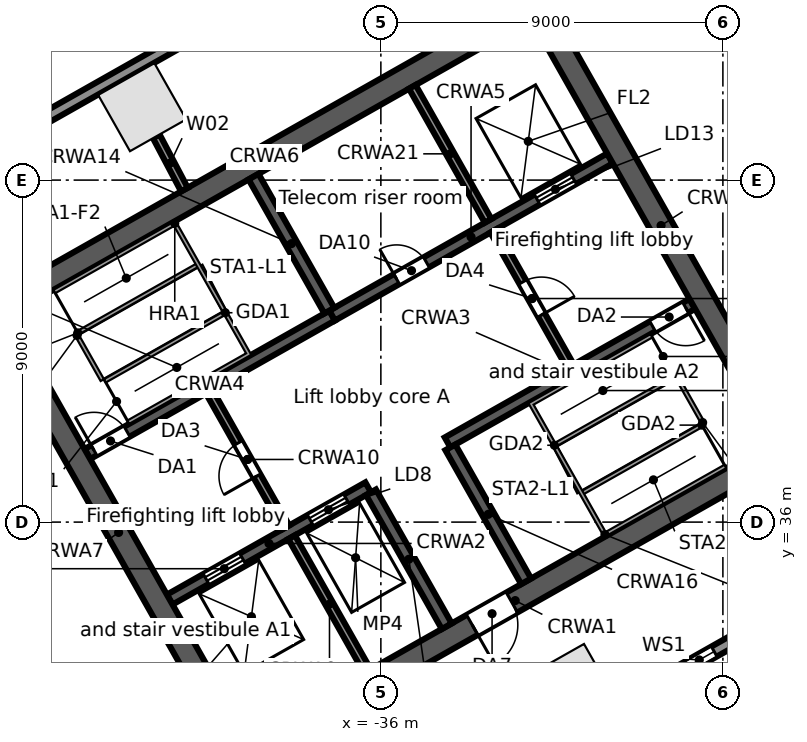
"""IFC4 building model, lengths in metres.
Left out: names, types, materials, properties, quantities, classifications, styles, units other than length and angle.
Written with IfcOpenShell. Run it as: python <this file> out.ifc"""

import sys

from ifc_helpers import new_model, si_unit, direction, frame, frame_2d, origin, origin_2d, place, context, subcontext, project, spatial, rectangle, extrude, element, fill, save


model = new_model("IFC4")
c1 = context("Model", 3, precision=1e-05, world=origin(), true_north=direction((0.0, 1.0)))
c2 = subcontext(c1, "Body", "Model", "MODEL_VIEW")
j1 = project(units=[si_unit("LENGTHUNIT", "METRE"), si_unit("PLANEANGLEUNIT", "RADIAN")], contexts=[c1])
p1 = place(None, origin())
s1 = spatial("IfcSite", under=j1, at=p1, CompositionType="ELEMENT")
p2 = place(p1, origin())
s2 = spatial("IfcBuilding", under=s1, at=p2, CompositionType="ELEMENT")
p3 = place(p2, frame((0.0, 0.0, 71.5)))
s3 = spatial("IfcBuildingStorey", under=s2, at=p3, CompositionType="ELEMENT", Elevation=71.5)
for number, where, z_axis, x_axis in (
    (1, (-42.28, 46.919, 0.0), (0.0, 0.0, 1.0), (-0.87, -0.492, 0.0)),
    (2, (-30.976, 31.635, 0.0), (0.0, 0.0, 1.0), (0.87, 0.492, 0.0)),
):
    element("IfcColumn", number, at=place(p3, frame(where, z_axis=z_axis, x_axis=x_axis)), inside=s3, PredefinedType="COLUMN", context=c2, shape_type="SweptSolid", body=[
        extrude(rectangle(XDim=1.7, YDim=1.7, at=origin_2d()), origin(), (0.0, 0.0, 1.0), 5.0),
    ])
p4 = place(p3, frame((-58.745, 38.764, 0.0), z_axis=(0.0, 0.0, 1.0), x_axis=(0.870355811726, 0.492423355453, 0.0)))
e3 = element("IfcWall", 3, at=p4, inside=s3, PredefinedType="STANDARD", context=c2, shape_type="SweptSolid", body=[
    extrude(rectangle(XDim=64.025, YDim=0.3, at=frame_2d((32.013, 0.0))), origin(), (0.0, 0.0, 1.0), 4.68),
])
p5 = place(p4, frame((60.122, 0.0, 0.6)))
e4 = element("IfcOpeningElement", 4, at=p5, cuts=e3, PredefinedType="OPENING", context=c2, shape_type="SweptSolid", body=[
    extrude(rectangle(XDim=0.9, YDim=3.2, at=frame_2d((0.45, 1.6))), frame((0.0, 0.16, 0.0), z_axis=(0.0, -1.0, 0.0), x_axis=(1.0, 0.0, 0.0)), (0.0, 0.0, 1.0), 0.32),
])
p6 = place(p4, frame((50.992, 0.0, 0.6)))
e5 = element("IfcOpeningElement", 5, at=p6, cuts=e3, PredefinedType="OPENING", context=c2, shape_type="SweptSolid", body=[
    extrude(rectangle(XDim=0.9, YDim=3.2, at=frame_2d((0.45, 1.6))), frame((0.0, 0.16, 0.0), z_axis=(0.0, -1.0, 0.0), x_axis=(1.0, 0.0, 0.0)), (0.0, 0.0, 1.0), 0.32),
])
p7 = place(p4, frame((41.862, 0.0, 0.6)))
e6 = element("IfcOpeningElement", 6, at=p7, cuts=e3, PredefinedType="OPENING", context=c2, shape_type="SweptSolid", body=[
    extrude(rectangle(XDim=0.9, YDim=3.2, at=frame_2d((0.45, 1.6))), frame((0.0, 0.16, 0.0), z_axis=(0.0, -1.0, 0.0), x_axis=(1.0, 0.0, 0.0)), (0.0, 0.0, 1.0), 0.32),
])
p8 = place(p4, frame((32.732, 0.0, 0.6)))
e7 = element("IfcOpeningElement", 7, at=p8, cuts=e3, PredefinedType="OPENING", context=c2, shape_type="SweptSolid", body=[
    extrude(rectangle(XDim=0.9, YDim=3.2, at=frame_2d((0.45, 1.6))), frame((0.0, 0.16, 0.0), z_axis=(0.0, -1.0, 0.0), x_axis=(1.0, 0.0, 0.0)), (0.0, 0.0, 1.0), 0.32),
])
p9 = place(p4, frame((23.602, 0.0, 0.6)))
e8 = element("IfcOpeningElement", 8, at=p9, cuts=e3, PredefinedType="OPENING", context=c2, shape_type="SweptSolid", body=[
    extrude(rectangle(XDim=0.9, YDim=3.2, at=frame_2d((0.45, 1.6))), frame((0.0, 0.16, 0.0), z_axis=(0.0, -1.0, 0.0), x_axis=(1.0, 0.0, 0.0)), (0.0, 0.0, 1.0), 0.32),
])
p10 = place(p4, frame((14.472, 0.0, 0.6)))
e9 = element("IfcOpeningElement", 9, at=p10, cuts=e3, PredefinedType="OPENING", context=c2, shape_type="SweptSolid", body=[
    extrude(rectangle(XDim=0.9, YDim=3.2, at=frame_2d((0.45, 1.6))), frame((0.0, 0.16, 0.0), z_axis=(0.0, -1.0, 0.0), x_axis=(1.0, 0.0, 0.0)), (0.0, 0.0, 1.0), 0.32),
])
p11 = place(p4, frame((5.342, 0.0, 0.6)))
e10 = element("IfcOpeningElement", 10, at=p11, cuts=e3, PredefinedType="OPENING", context=c2, shape_type="SweptSolid", body=[
    extrude(rectangle(XDim=0.9, YDim=3.2, at=frame_2d((0.45, 1.6))), frame((0.0, 0.16, 0.0), z_axis=(0.0, -1.0, 0.0), x_axis=(1.0, 0.0, 0.0)), (0.0, 0.0, 1.0), 0.32),
])
p12 = place(p3, frame((-44.109, 26.504, 0.0), z_axis=(0.0, 0.0, 1.0), x_axis=(-0.857169502585, 0.515034410344, 0.0)))
e11 = element("IfcWall", 11, at=p12, inside=s3, PredefinedType="STANDARD", context=c2, shape_type="SweptSolid", body=[
    extrude(rectangle(XDim=17.127, YDim=0.3, at=frame_2d((8.563, 0.0))), origin(), (0.0, 0.0, 1.0), 4.68),
])
p13 = place(p12, frame((13.403, 0.0, 0.6)))
e12 = element("IfcOpeningElement", 12, at=p13, cuts=e11, PredefinedType="OPENING", context=c2, shape_type="SweptSolid", body=[
    extrude(rectangle(XDim=0.9, YDim=3.2, at=frame_2d((0.45, 1.6))), frame((0.0, 0.16, 0.0), z_axis=(0.0, -1.0, 0.0), x_axis=(1.0, 0.0, 0.0)), (0.0, 0.0, 1.0), 0.32),
])
p14 = place(p12, frame((4.903, 0.0, 0.6)))
e13 = element("IfcOpeningElement", 13, at=p14, cuts=e11, PredefinedType="OPENING", context=c2, shape_type="SweptSolid", body=[
    extrude(rectangle(XDim=0.9, YDim=3.2, at=frame_2d((0.45, 1.6))), frame((0.0, 0.16, 0.0), z_axis=(0.0, -1.0, 0.0), x_axis=(1.0, 0.0, 0.0)), (0.0, 0.0, 1.0), 0.32),
])
p15 = place(p3, frame((-0.055, 47.969, 0.0), z_axis=(0.0, 0.0, 1.0), x_axis=(-0.870355730478, -0.492423499058, 0.0)))
e14 = element("IfcWall", 14, at=p15, inside=s3, PredefinedType="STANDARD", context=c2, shape_type="SweptSolid", body=[
    extrude(rectangle(XDim=43.75, YDim=0.3, at=frame_2d((21.875, 0.0))), origin(), (0.0, 0.0, 1.0), 4.68),
])
p16 = place(p15, frame((39.977, 0.0, 0.6)))
e15 = element("IfcOpeningElement", 15, at=p16, cuts=e14, PredefinedType="OPENING", context=c2, shape_type="SweptSolid", body=[
    extrude(rectangle(XDim=0.9, YDim=3.2, at=frame_2d((0.45, 1.6))), frame((0.0, 0.16, 0.0), z_axis=(0.0, -1.0, 0.0), x_axis=(1.0, 0.0, 0.0)), (0.0, 0.0, 1.0), 0.32),
])
p17 = place(p15, frame((31.222, 0.0, 0.6)))
e16 = element("IfcOpeningElement", 16, at=p17, cuts=e14, PredefinedType="OPENING", context=c2, shape_type="SweptSolid", body=[
    extrude(rectangle(XDim=0.9, YDim=3.2, at=frame_2d((0.45, 1.6))), frame((0.0, 0.16, 0.0), z_axis=(0.0, -1.0, 0.0), x_axis=(1.0, 0.0, 0.0)), (0.0, 0.0, 1.0), 0.32),
])
p18 = place(p15, frame((22.468, 0.0, 0.6)))
e17 = element("IfcOpeningElement", 17, at=p18, cuts=e14, PredefinedType="OPENING", context=c2, shape_type="SweptSolid", body=[
    extrude(rectangle(XDim=0.9, YDim=3.2, at=frame_2d((0.45, 1.6))), frame((0.0, 0.16, 0.0), z_axis=(0.0, -1.0, 0.0), x_axis=(1.0, 0.0, 0.0)), (0.0, 0.0, 1.0), 0.32),
])
p19 = place(p15, frame((13.713, 0.0, 0.6)))
e18 = element("IfcOpeningElement", 18, at=p19, cuts=e14, PredefinedType="OPENING", context=c2, shape_type="SweptSolid", body=[
    extrude(rectangle(XDim=0.9, YDim=3.2, at=frame_2d((0.45, 1.6))), frame((0.0, 0.16, 0.0), z_axis=(0.0, -1.0, 0.0), x_axis=(1.0, 0.0, 0.0)), (0.0, 0.0, 1.0), 0.32),
])
p20 = place(p15, frame((4.959, 0.0, 0.6)))
e19 = element("IfcOpeningElement", 19, at=p20, cuts=e14, PredefinedType="OPENING", context=c2, shape_type="SweptSolid", body=[
    extrude(rectangle(XDim=0.9, YDim=3.2, at=frame_2d((0.45, 1.6))), frame((0.0, 0.16, 0.0), z_axis=(0.0, -1.0, 0.0), x_axis=(1.0, 0.0, 0.0)), (0.0, 0.0, 1.0), 0.32),
])
p21 = place(p3, frame((-39.862, 29.749, 0.0), z_axis=(0.0, 0.0, 1.0), x_axis=(0.870350116061, 0.492433422375, 0.0)))
e20 = element("IfcWall", 20, at=p21, inside=s3, PredefinedType="SOLIDWALL", context=c2, shape_type="SweptSolid", body=[
    extrude(rectangle(XDim=17.0, YDim=0.6, at=frame_2d((8.5, 0.0))), origin(), (0.0, 0.0, 1.0), 4.68),
])
p22 = place(p21, frame((7.2, 0.0, 0.0)))
e21 = element("IfcOpeningElement", 21, at=p22, cuts=e20, PredefinedType="OPENING", context=c2, shape_type="SweptSolid", body=[
    extrude(rectangle(XDim=1.2, YDim=2.1, at=frame_2d((0.6, 1.05))), frame((0.0, 0.31, 0.0), z_axis=(0.0, -1.0, 0.0), x_axis=(1.0, 0.0, 0.0)), (0.0, 0.0, 1.0), 0.62),
])
p23 = place(p3, frame((-41.556, 33.961, 0.0), z_axis=(0.0, 0.0, 1.0), x_axis=(0.870343731308, 0.492444706919, 0.0)))
e22 = element("IfcWall", 22, at=p23, inside=s3, PredefinedType="SOLIDWALL", context=c2, shape_type="SweptSolid", body=[
    extrude(rectangle(XDim=6.0, YDim=0.3, at=frame_2d((3.0, 0.0))), origin(), (0.0, 0.0, 1.0), 4.68),
])
p24 = place(p23, frame((1.1, 0.0, 0.0)))
e23 = element("IfcOpeningElement", 23, at=p24, cuts=e22, PredefinedType="OPENING", context=c2, shape_type="SweptSolid", body=[
    extrude(rectangle(XDim=1.1, YDim=2.1, at=frame_2d((0.55, 1.05))), frame((0.0, 0.16, 0.0), z_axis=(0.0, -1.0, 0.0), x_axis=(1.0, 0.0, 0.0)), (0.0, 0.0, 1.0), 0.32),
])
p25 = place(p23, frame((4.25, 0.0, 0.0)))
e24 = element("IfcOpeningElement", 24, at=p25, cuts=e22, PredefinedType="OPENING", context=c2, shape_type="SweptSolid", body=[
    extrude(rectangle(XDim=1.1, YDim=2.1, at=frame_2d((0.55, 1.05))), frame((0.0, 0.16, 0.0), z_axis=(0.0, -1.0, 0.0), x_axis=(1.0, 0.0, 0.0)), (0.0, 0.0, 1.0), 0.32),
])
p26 = place(p3, frame((-34.245, 38.097, 0.0), z_axis=(0.0, 0.0, 1.0), x_axis=(0.870364910201, 0.492407273597, 0.0)))
e25 = element("IfcWall", 25, at=p26, inside=s3, PredefinedType="SOLIDWALL", context=c2, shape_type="SweptSolid", body=[
    extrude(rectangle(XDim=7.4, YDim=0.3, at=frame_2d((3.7, 0.0))), origin(), (0.0, 0.0, 1.0), 4.68),
])
p27 = place(p26, frame((6.2, 0.0, 0.0)))
e26 = element("IfcOpeningElement", 26, at=p27, cuts=e25, PredefinedType="OPENING", context=c2, shape_type="SweptSolid", body=[
    extrude(rectangle(XDim=1.0, YDim=2.1, at=frame_2d((0.5, 1.05))), frame((0.0, 0.16, 0.0), z_axis=(0.0, -1.0, 0.0), x_axis=(1.0, 0.0, 0.0)), (0.0, 0.0, 1.0), 0.32),
])
p28 = place(p3, frame((-43.723, 37.791, 0.0), z_axis=(0.0, 0.0, 1.0), x_axis=(0.87035077051, 0.49243226567, 0.0)))
e27 = element("IfcWall", 27, at=p28, inside=s3, PredefinedType="SOLIDWALL", context=c2, shape_type="SweptSolid", body=[
    extrude(rectangle(XDim=7.4, YDim=0.3, at=frame_2d((3.7, 0.0))), origin(), (0.0, 0.0, 1.0), 4.68),
])
p29 = place(p28, frame((0.2, 0.0, 0.0)))
e28 = element("IfcOpeningElement", 28, at=p29, cuts=e27, PredefinedType="OPENING", context=c2, shape_type="SweptSolid", body=[
    extrude(rectangle(XDim=1.0, YDim=2.1, at=frame_2d((0.5, 1.05))), frame((0.0, 0.16, 0.0), z_axis=(0.0, -1.0, 0.0), x_axis=(1.0, 0.0, 0.0)), (0.0, 0.0, 1.0), 0.32),
])
p30 = place(p3, frame((-37.282, 41.435, 0.0), z_axis=(0.0, 0.0, 1.0), x_axis=(0.870356516133, 0.492422110414, 0.0)))
e29 = element("IfcWall", 29, at=p30, inside=s3, PredefinedType="SOLIDWALL", context=c2, shape_type="SweptSolid", body=[
    extrude(rectangle(XDim=8.4, YDim=0.3, at=frame_2d((4.2, 0.0))), origin(), (0.0, 0.0, 1.0), 4.68),
])
p31 = place(p30, frame((6.2, 0.0, 0.0)))
e30 = element("IfcOpeningElement", 30, at=p31, cuts=e29, PredefinedType="OPENING", context=c2, shape_type="SweptSolid", body=[
    extrude(rectangle(XDim=1.1, YDim=2.1, at=frame_2d((0.55, 1.05))), frame((0.0, 0.16, 0.0), z_axis=(0.0, -1.0, 0.0), x_axis=(1.0, 0.0, 0.0)), (0.0, 0.0, 1.0), 0.32),
])
p32 = place(p30, frame((1.95, 0.0, 0.0)))
e31 = element("IfcOpeningElement", 31, at=p32, cuts=e29, PredefinedType="OPENING", context=c2, shape_type="SweptSolid", body=[
    extrude(rectangle(XDim=0.9, YDim=2.1, at=frame_2d((0.45, 1.05))), frame((0.0, 0.16, 0.0), z_axis=(0.0, -1.0, 0.0), x_axis=(1.0, 0.0, 0.0)), (0.0, 0.0, 1.0), 0.32),
])
p33 = place(p3, frame((-46.461, 41.412, 0.0), z_axis=(0.0, 0.0, 1.0), x_axis=(0.870350116061, 0.492433422375, 0.0)))
e32 = element("IfcWall", 32, at=p33, inside=s3, PredefinedType="SOLIDWALL", context=c2, shape_type="SweptSolid", body=[
    extrude(rectangle(XDim=17.0, YDim=0.6, at=frame_2d((8.5, 0.0))), origin(), (0.0, 0.0, 1.0), 4.68),
])
p34 = place(p3, frame((-46.052, 41.298, 0.0), z_axis=(0.0, 0.0, 1.0), x_axis=(0.492418598281, -0.870358503186, 0.0)))
e33 = element("IfcWall", 33, at=p34, inside=s3, PredefinedType="SOLIDWALL", context=c2, shape_type="SweptSolid", body=[
    extrude(rectangle(XDim=12.8, YDim=0.6, at=frame_2d((6.4, 0.0))), origin(), (0.0, 0.0, 1.0), 4.68),
])
p35 = place(p3, frame((-38.349, 35.603, 0.0), z_axis=(0.0, 0.0, 1.0), x_axis=(0.49241474071, -0.870360685654, 0.0)))
e34 = element("IfcWall", 34, at=p35, inside=s3, PredefinedType="SOLIDWALL", context=c2, shape_type="SweptSolid", body=[
    extrude(rectangle(XDim=4.05, YDim=0.2, at=frame_2d((2.025, 0.0))), origin(), (0.0, 0.0, 1.0), 4.68),
])
p36 = place(p3, frame((-40.516, 39.433, 0.0), z_axis=(0.0, 0.0, 1.0), x_axis=(0.492453559952, -0.87033872216, 0.0)))
e35 = element("IfcWall", 35, at=p36, inside=s3, PredefinedType="PARTITIONING", context=c2, shape_type="SweptSolid", body=[
    extrude(rectangle(XDim=4.1, YDim=0.2, at=frame_2d((2.05, 0.0))), origin(), (0.0, 0.0, 1.0), 4.68),
])
p37 = place(p36, frame((1.55, 0.0, 0.0)))
e36 = element("IfcOpeningElement", 36, at=p37, cuts=e35, PredefinedType="OPENING", context=c2, shape_type="SweptSolid", body=[
    extrude(rectangle(XDim=1.0, YDim=2.1, at=frame_2d((0.5, 1.05))), frame((0.0, 0.11, 0.0), z_axis=(0.0, -1.0, 0.0), x_axis=(1.0, 0.0, 0.0)), (0.0, 0.0, 1.0), 0.22),
])
p38 = place(p3, frame((-36.26, 36.785, 0.0), z_axis=(0.0, 0.0, 1.0), x_axis=(0.492440575896, -0.870346068648, 0.0)))
e37 = element("IfcWall", 37, at=p38, inside=s3, PredefinedType="SOLIDWALL", context=c2, shape_type="SweptSolid", body=[
    extrude(rectangle(XDim=4.05, YDim=0.3, at=frame_2d((2.025, 0.0))), origin(), (0.0, 0.0, 1.0), 4.68),
])
p39 = place(p3, frame((-39.35, 45.09, 0.0), z_axis=(0.0, 0.0, 1.0), x_axis=(0.49241474071, -0.870360685654, 0.0)))
e38 = element("IfcWall", 38, at=p39, inside=s3, PredefinedType="SOLIDWALL", context=c2, shape_type="SweptSolid", body=[
    extrude(rectangle(XDim=4.05, YDim=0.3, at=frame_2d((2.025, 0.0))), origin(), (0.0, 0.0, 1.0), 4.68),
])
p40 = place(p3, frame((-34.171, 37.967, 0.0), z_axis=(0.0, 0.0, 1.0), x_axis=(0.492394910396, -0.870371904542, 0.0)))
e39 = element("IfcWall", 39, at=p40, inside=s3, PredefinedType="SOLIDWALL", context=c2, shape_type="SweptSolid", body=[
    extrude(rectangle(XDim=4.05, YDim=0.3, at=frame_2d((2.025, 0.0))), origin(), (0.0, 0.0, 1.0), 4.68),
])
p41 = place(p3, frame((-33.031, 43.667, 0.0), z_axis=(0.0, 0.0, 1.0), x_axis=(0.492408451753, -0.87036424366, 0.0)))
e40 = element("IfcWall", 40, at=p41, inside=s3, PredefinedType="PARTITIONING", context=c2, shape_type="SweptSolid", body=[
    extrude(rectangle(XDim=4.1, YDim=0.2, at=frame_2d((2.05, 0.0))), origin(), (0.0, 0.0, 1.0), 4.68),
])
p42 = place(p41, frame((1.55, 0.0, 0.0)))
e41 = element("IfcOpeningElement", 41, at=p42, cuts=e40, PredefinedType="OPENING", context=c2, shape_type="SweptSolid", body=[
    extrude(rectangle(XDim=1.0, YDim=2.1, at=frame_2d((0.5, 1.05))), frame((0.0, 0.11, 0.0), z_axis=(0.0, -1.0, 0.0), x_axis=(1.0, 0.0, 0.0)), (0.0, 0.0, 1.0), 0.22),
])
p43 = place(p3, frame((-35.173, 47.454, 0.0), z_axis=(0.0, 0.0, 1.0), x_axis=(0.492440575896, -0.870346068648, 0.0)))
e42 = element("IfcWall", 42, at=p43, inside=s3, PredefinedType="SOLIDWALL", context=c2, shape_type="SweptSolid", body=[
    extrude(rectangle(XDim=4.05, YDim=0.2, at=frame_2d((2.025, 0.0))), origin(), (0.0, 0.0, 1.0), 4.68),
])
p44 = place(p3, frame((-31.778, 49.374, 0.0), z_axis=(0.0, 0.0, 1.0), x_axis=(0.492433046652, -0.870350328641, 0.0)))
e43 = element("IfcWall", 43, at=p44, inside=s3, PredefinedType="SOLIDWALL", context=c2, shape_type="SweptSolid", body=[
    extrude(rectangle(XDim=12.8, YDim=0.6, at=frame_2d((6.4, 0.0))), origin(), (0.0, 0.0, 1.0), 4.68),
])
p45 = place(p3, frame((-41.909, 46.152, 0.0), z_axis=(0.0, 0.0, 1.0), x_axis=(0.466755273883, -0.884386518612, 0.0)))
e44 = element("IfcWall", 44, at=p45, inside=s3, PredefinedType="PARTITIONING", context=c2, shape_type="SweptSolid", body=[
    extrude(rectangle(XDim=1.585, YDim=0.2, at=frame_2d((0.793, 0.0))), origin(), (0.0, 0.0, 1.0), 4.26),
])
p46 = place(p17, origin())
e45 = element("IfcWindow", 45, at=p46, inside=s3, PartitioningType="SINGLE_PANEL", PredefinedType="WINDOW", context=c2, shape_type="SweptSolid", body=[
    extrude(rectangle(XDim=0.9, YDim=3.2, at=frame_2d((0.45, 1.6))), frame((0.0, 0.03, 0.0), z_axis=(0.0, -1.0, 0.0), x_axis=(1.0, 0.0, 0.0)), (0.0, 0.0, 1.0), 0.06),
])
fill(e16, e45)
p47 = place(p31, origin())
e46 = element("IfcDoor", 46, at=p47, inside=s3, OperationType="DOUBLE_DOOR_SLIDING", PredefinedType="DOOR", context=c2, shape_type="SweptSolid", body=[
    extrude(rectangle(XDim=1.1, YDim=2.1, at=frame_2d((0.55, 1.05))), frame((0.0, 0.025, 0.0), z_axis=(0.0, -1.0, 0.0), x_axis=(1.0, 0.0, 0.0)), (0.0, 0.0, 1.0), 0.05),
])
fill(e30, e46)
p48 = place(p24, origin())
e47 = element("IfcDoor", 47, at=p48, inside=s3, OperationType="DOUBLE_DOOR_SLIDING", PredefinedType="DOOR", context=c2, shape_type="SweptSolid", body=[
    extrude(rectangle(XDim=1.1, YDim=2.1, at=frame_2d((0.55, 1.05))), frame((0.0, 0.025, 0.0), z_axis=(0.0, -1.0, 0.0), x_axis=(1.0, 0.0, 0.0)), (0.0, 0.0, 1.0), 0.05),
])
fill(e23, e47)
p49 = place(p25, origin())
e48 = element("IfcDoor", 48, at=p49, inside=s3, OperationType="DOUBLE_DOOR_SLIDING", PredefinedType="DOOR", context=c2, shape_type="SweptSolid", body=[
    extrude(rectangle(XDim=1.1, YDim=2.1, at=frame_2d((0.55, 1.05))), frame((0.0, 0.025, 0.0), z_axis=(0.0, -1.0, 0.0), x_axis=(1.0, 0.0, 0.0)), (0.0, 0.0, 1.0), 0.05),
])
fill(e24, e48)
p50 = place(p29, origin())
e49 = element("IfcDoor", 49, at=p50, inside=s3, OperationType="SINGLE_SWING_LEFT", PredefinedType="DOOR", context=c2, shape_type="SweptSolid", body=[
    extrude(rectangle(XDim=1.0, YDim=2.1, at=frame_2d((0.5, 1.05))), frame((0.0, 0.025, 0.0), z_axis=(0.0, -1.0, 0.0), x_axis=(1.0, 0.0, 0.0)), (0.0, 0.0, 1.0), 0.05),
])
fill(e28, e49)
p51 = place(p27, frame((1.0, 0.0, 0.0), z_axis=(0.0, 0.0, 1.0), x_axis=(-1.0, 0.0, 0.0)))
e50 = element("IfcDoor", 50, at=p51, inside=s3, OperationType="SINGLE_SWING_LEFT", PredefinedType="DOOR", context=c2, shape_type="SweptSolid", body=[
    extrude(rectangle(XDim=1.0, YDim=2.1, at=frame_2d((0.5, 1.05))), frame((0.0, 0.025, 0.0), z_axis=(0.0, -1.0, 0.0), x_axis=(1.0, 0.0, 0.0)), (0.0, 0.0, 1.0), 0.05),
])
fill(e26, e50)
p52 = place(p37, frame((1.0, 0.0, 0.0), z_axis=(0.0, 0.0, 1.0), x_axis=(-1.0, 0.0, 0.0)))
e51 = element("IfcDoor", 51, at=p52, inside=s3, OperationType="SINGLE_SWING_LEFT", PredefinedType="DOOR", context=c2, shape_type="SweptSolid", body=[
    extrude(rectangle(XDim=1.0, YDim=2.1, at=frame_2d((0.5, 1.05))), frame((0.0, 0.025, 0.0), z_axis=(0.0, -1.0, 0.0), x_axis=(1.0, 0.0, 0.0)), (0.0, 0.0, 1.0), 0.05),
])
fill(e36, e51)
p53 = place(p42, origin())
e52 = element("IfcDoor", 52, at=p53, inside=s3, OperationType="SINGLE_SWING_RIGHT", PredefinedType="DOOR", context=c2, shape_type="SweptSolid", body=[
    extrude(rectangle(XDim=1.0, YDim=2.1, at=frame_2d((0.5, 1.05))), frame((0.0, 0.025, 0.0), z_axis=(0.0, -1.0, 0.0), x_axis=(1.0, 0.0, 0.0)), (0.0, 0.0, 1.0), 0.05),
])
fill(e41, e52)
p54 = place(p22, frame((1.2, 0.0, 0.0), z_axis=(0.0, 0.0, 1.0), x_axis=(-1.0, 0.0, 0.0)))
e53 = element("IfcDoor", 53, at=p54, inside=s3, OperationType="SINGLE_SWING_RIGHT", PredefinedType="DOOR", context=c2, shape_type="SweptSolid", body=[
    extrude(rectangle(XDim=1.2, YDim=2.1, at=frame_2d((0.6, 1.05))), frame((0.0, 0.025, 0.0), z_axis=(0.0, -1.0, 0.0), x_axis=(1.0, 0.0, 0.0)), (0.0, 0.0, 1.0), 0.05),
])
fill(e21, e53)
p55 = place(p32, origin())
e54 = element("IfcDoor", 54, at=p55, inside=s3, OperationType="SINGLE_SWING_LEFT", PredefinedType="DOOR", context=c2, shape_type="SweptSolid", body=[
    extrude(rectangle(XDim=0.9, YDim=2.1, at=frame_2d((0.45, 1.05))), frame((0.0, 0.025, 0.0), z_axis=(0.0, -1.0, 0.0), x_axis=(1.0, 0.0, 0.0)), (0.0, 0.0, 1.0), 0.05),
])
fill(e31, e54)
save(model, sys.argv[1])
